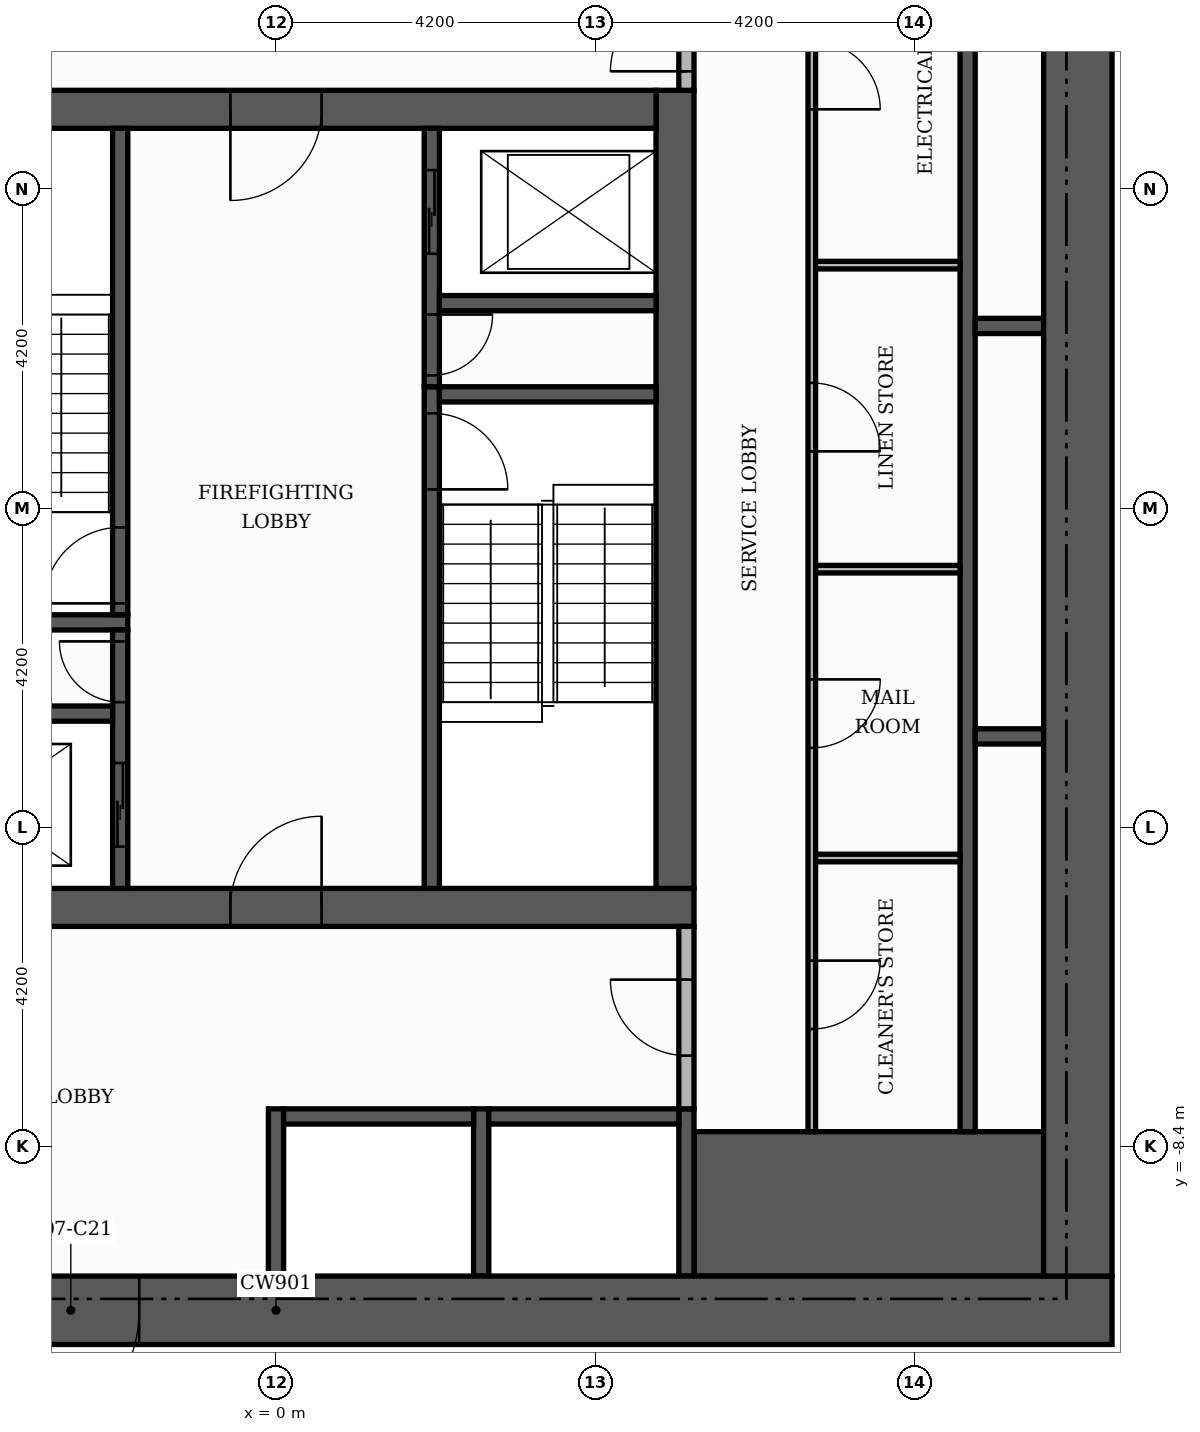
"""IFC4 building model, lengths in metres.
Left out: names, types, materials, properties, quantities, classifications, styles, units other than length and angle.
Written with IfcOpenShell. Run it as: python <this file> out.ifc"""

import sys

from ifc_helpers import new_model, si_unit, direction, frame, frame_2d, origin, place, context, subcontext, project, spatial, rectangle, extrude, element, fill, save


model = new_model("IFC4")
c1 = context("Model", 3, precision=1e-05, world=origin(), true_north=direction((0.0, 1.0)))
c2 = subcontext(c1, "Body", "Model", "MODEL_VIEW")
j1 = project(units=[si_unit("LENGTHUNIT", "METRE"), si_unit("PLANEANGLEUNIT", "RADIAN")], contexts=[c1])
p1 = place(None, origin())
s1 = spatial("IfcSite", under=j1, at=p1, CompositionType="ELEMENT")
p2 = place(p1, origin())
s2 = spatial("IfcBuilding", under=s1, at=p2, CompositionType="ELEMENT")
p3 = place(p2, frame((0.0, 0.0, 34.8)))
s3 = spatial("IfcBuildingStorey", under=s2, at=p3, CompositionType="ELEMENT", Elevation=34.8)
p4 = place(p3, frame((-5.5, -5.25, 0.0), z_axis=(0.0, 0.0, 1.0), x_axis=(1.0, 0.0, 0.0)))
e1 = element("IfcWall", 1, at=p4, inside=s3, PredefinedType="SHEAR", context=c2, shape_type="SweptSolid", body=[
    extrude(rectangle(XDim=11.0, YDim=0.5, at=frame_2d((5.5, 0.0))), origin(), (0.0, 0.0, 1.0), 3.48),
])
p5 = place(p4, frame((4.9, 0.0, 0.0)))
e2 = element("IfcOpeningElement", 2, at=p5, cuts=e1, PredefinedType="OPENING", context=c2, shape_type="SweptSolid", body=[
    extrude(rectangle(XDim=1.2, YDim=2.1, at=frame_2d((0.6, 1.05))), frame((0.0, 0.26, 0.0), z_axis=(0.0, -1.0, 0.0), x_axis=(1.0, 0.0, 0.0)), (0.0, 0.0, 1.0), 0.52),
])
p6 = place(p3, frame((5.25, -5.0, 0.0), z_axis=(0.0, 0.0, 1.0), x_axis=(0.0, 1.0, 0.0)))
e3 = element("IfcWall", 3, at=p6, inside=s3, PredefinedType="SHEAR", context=c2, shape_type="SweptSolid", body=[
    extrude(rectangle(XDim=10.5, YDim=0.5, at=frame_2d((5.25, 0.0))), origin(), (0.0, 0.0, 1.0), 3.48),
])
p7 = place(p3, frame((-5.0, 5.25, 0.0), z_axis=(0.0, 0.0, 1.0), x_axis=(1.0, 0.0, 0.0)))
e4 = element("IfcWall", 4, at=p7, inside=s3, PredefinedType="SHEAR", context=c2, shape_type="SweptSolid", body=[
    extrude(rectangle(XDim=10.0, YDim=0.5, at=frame_2d((5.0, 0.0))), origin(), (0.0, 0.0, 1.0), 3.48),
])
p8 = place(p7, frame((4.4, 0.0, 0.0)))
e5 = element("IfcOpeningElement", 5, at=p8, cuts=e4, PredefinedType="OPENING", context=c2, shape_type="SweptSolid", body=[
    extrude(rectangle(XDim=1.2, YDim=2.1, at=frame_2d((0.6, 1.05))), frame((0.0, 0.26, 0.0), z_axis=(0.0, -1.0, 0.0), x_axis=(1.0, 0.0, 0.0)), (0.0, 0.0, 1.0), 0.52),
])
p9 = place(p3, frame((5.5, -9.15, 0.0), z_axis=(0.0, 0.0, 1.0), x_axis=(1.0, 0.0, 0.0)))
e6 = element("IfcWall", 6, at=p9, inside=s3, PredefinedType="SHEAR", context=c2, shape_type="SweptSolid", body=[
    extrude(rectangle(XDim=4.6, YDim=1.9, at=frame_2d((2.3, 0.0))), origin(), (0.0, 0.0, 1.0), 3.48),
])
p10 = place(p3, frame((2.05, -5.0, 0.0), z_axis=(0.0, 0.0, 1.0), x_axis=(0.0, 1.0, 0.0)))
e7 = element("IfcWall", 7, at=p10, inside=s3, PredefinedType="SHEAR", context=c2, shape_type="SweptSolid", body=[
    extrude(rectangle(XDim=6.6, YDim=0.2, at=frame_2d((3.3, 0.0))), origin(), (0.0, 0.0, 1.0), 3.48),
])
p11 = place(p10, frame((5.25, 0.0, 0.0)))
e8 = element("IfcOpeningElement", 8, at=p11, cuts=e7, PredefinedType="OPENING", context=c2, shape_type="SweptSolid", body=[
    extrude(rectangle(XDim=1.0, YDim=2.1, at=frame_2d((0.5, 1.05))), frame((0.0, 0.11, 0.0), z_axis=(0.0, -1.0, 0.0), x_axis=(1.0, 0.0, 0.0)), (0.0, 0.0, 1.0), 0.22),
])
p12 = place(p3, frame((-5.0, -1.5, 0.0), z_axis=(0.0, 0.0, 1.0), x_axis=(1.0, 0.0, 0.0)))
e9 = element("IfcWall", 9, at=p12, inside=s3, PredefinedType="SHEAR", context=c2, shape_type="SweptSolid", body=[
    extrude(rectangle(XDim=3.05, YDim=0.2, at=frame_2d((1.525, 0.0))), origin(), (0.0, 0.0, 1.0), 3.48),
])
p13 = place(p3, frame((-2.05, -1.4, 0.0), z_axis=(0.0, 0.0, 1.0), x_axis=(0.0, 1.0, 0.0)))
e10 = element("IfcWall", 10, at=p13, inside=s3, PredefinedType="SHEAR", context=c2, shape_type="SweptSolid", body=[
    extrude(rectangle(XDim=6.4, YDim=0.2, at=frame_2d((3.2, 0.0))), origin(), (0.0, 0.0, 1.0), 3.48),
])
p14 = place(p13, frame((0.15, 0.0, 0.0)))
e11 = element("IfcOpeningElement", 11, at=p14, cuts=e10, PredefinedType="OPENING", context=c2, shape_type="SweptSolid", body=[
    extrude(rectangle(XDim=1.0, YDim=2.1, at=frame_2d((0.5, 1.05))), frame((0.0, 0.11, 0.0), z_axis=(0.0, -1.0, 0.0), x_axis=(1.0, 0.0, 0.0)), (0.0, 0.0, 1.0), 0.22),
])
p15 = place(p3, frame((2.15, 1.5, 0.0), z_axis=(0.0, 0.0, 1.0), x_axis=(1.0, 0.0, 0.0)))
e12 = element("IfcWall", 12, at=p15, inside=s3, PredefinedType="SHEAR", context=c2, shape_type="SweptSolid", body=[
    extrude(rectangle(XDim=2.85, YDim=0.2, at=frame_2d((1.425, 0.0))), origin(), (0.0, 0.0, 1.0), 3.48),
])
for number, where, z_axis, x_axis in (
    (13, (0.0, -10.1, 0.0), (0.0, 0.0, 1.0), (0.0, 1.0, 0.0)),
    (14, (2.7, -10.1, 0.0), (0.0, 0.0, 1.0), (0.0, 1.0, 0.0)),
    (15, (5.4, -10.1, 0.0), (0.0, 0.0, 1.0), (0.0, 1.0, 0.0)),
):
    element("IfcWall", number, at=place(p3, frame(where, z_axis=z_axis, x_axis=x_axis)), inside=s3, PredefinedType="SHEAR", context=c2, shape_type="SweptSolid", body=[
        extrude(rectangle(XDim=2.2, YDim=0.2, at=frame_2d((1.1, 0.0))), origin(), (0.0, 0.0, 1.0), 3.48),
    ])
p16 = place(p3, frame((9.1, -8.2, 0.0), z_axis=(0.0, 0.0, 1.0), x_axis=(0.0, 1.0, 0.0)))
e16 = element("IfcWall", 16, at=p16, inside=s3, PredefinedType="SHEAR", context=c2, shape_type="SweptSolid", body=[
    extrude(rectangle(XDim=16.4, YDim=0.2, at=frame_2d((8.2, 0.0))), origin(), (0.0, 0.0, 1.0), 3.48),
])
for number, where, z_axis, x_axis in (
    (17, (0.1, -8.0, 0.0), (0.0, 0.0, 1.0), (1.0, 0.0, 0.0)),
    (18, (2.8, -8.0, 0.0), (0.0, 0.0, 1.0), (1.0, 0.0, 0.0)),
):
    element("IfcWall", number, at=place(p3, frame(where, z_axis=z_axis, x_axis=x_axis)), inside=s3, PredefinedType="SHEAR", context=c2, shape_type="SweptSolid", body=[
        extrude(rectangle(XDim=2.5, YDim=0.2, at=frame_2d((1.25, 0.0))), origin(), (0.0, 0.0, 1.0), 3.48),
    ])
p17 = place(p3, frame((-2.05, -5.0, 0.0), z_axis=(0.0, 0.0, 1.0), x_axis=(0.0, 1.0, 0.0)))
e19 = element("IfcWall", 19, at=p17, inside=s3, PredefinedType="SHEAR", context=c2, shape_type="SweptSolid", body=[
    extrude(rectangle(XDim=3.4, YDim=0.2, at=frame_2d((1.7, 0.0))), origin(), (0.0, 0.0, 1.0), 3.48),
])
p18 = place(p17, frame((0.55, 0.0, 0.0)))
e20 = element("IfcOpeningElement", 20, at=p18, cuts=e19, PredefinedType="OPENING", context=c2, shape_type="SweptSolid", body=[
    extrude(rectangle(XDim=1.1, YDim=2.1, at=frame_2d((0.55, 1.05))), frame((0.0, 0.11, 0.0), z_axis=(0.0, -1.0, 0.0), x_axis=(1.0, 0.0, 0.0)), (0.0, 0.0, 1.0), 0.22),
])
p19 = place(p17, frame((2.45, 0.0, 0.0)))
e21 = element("IfcOpeningElement", 21, at=p19, cuts=e19, PredefinedType="OPENING", context=c2, shape_type="SweptSolid", body=[
    extrude(rectangle(XDim=0.8, YDim=2.1, at=frame_2d((0.4, 1.05))), frame((0.0, 0.11, 0.0), z_axis=(0.0, -1.0, 0.0), x_axis=(1.0, 0.0, 0.0)), (0.0, 0.0, 1.0), 0.22),
])
p20 = place(p3, frame((9.2, -3.0, 0.0), z_axis=(0.0, 0.0, 1.0), x_axis=(1.0, 0.0, 0.0)))
e22 = element("IfcWall", 22, at=p20, inside=s3, PredefinedType="SHEAR", context=c2, shape_type="SweptSolid", body=[
    extrude(rectangle(XDim=0.9, YDim=0.2, at=frame_2d((0.45, 0.0))), origin(), (0.0, 0.0, 1.0), 3.48),
])
p21 = place(p3, frame((-5.0, -2.7, 0.0), z_axis=(0.0, 0.0, 1.0), x_axis=(1.0, 0.0, 0.0)))
e23 = element("IfcWall", 23, at=p21, inside=s3, PredefinedType="SHEAR", context=c2, shape_type="SweptSolid", body=[
    extrude(rectangle(XDim=2.85, YDim=0.2, at=frame_2d((1.425, 0.0))), origin(), (0.0, 0.0, 1.0), 3.48),
])
p22 = place(p3, frame((2.05, 1.6, 0.0), z_axis=(0.0, 0.0, 1.0), x_axis=(0.0, 1.0, 0.0)))
e24 = element("IfcWall", 24, at=p22, inside=s3, PredefinedType="SHEAR", context=c2, shape_type="SweptSolid", body=[
    extrude(rectangle(XDim=3.4, YDim=0.2, at=frame_2d((1.7, 0.0))), origin(), (0.0, 0.0, 1.0), 3.48),
])
p23 = place(p22, frame((1.75, 0.0, 0.0)))
e25 = element("IfcOpeningElement", 25, at=p23, cuts=e24, PredefinedType="OPENING", context=c2, shape_type="SweptSolid", body=[
    extrude(rectangle(XDim=1.1, YDim=2.1, at=frame_2d((0.55, 1.05))), frame((0.0, 0.11, 0.0), z_axis=(0.0, -1.0, 0.0), x_axis=(1.0, 0.0, 0.0)), (0.0, 0.0, 1.0), 0.22),
])
p24 = place(p22, frame((0.15, 0.0, 0.0)))
e26 = element("IfcOpeningElement", 26, at=p24, cuts=e24, PredefinedType="OPENING", context=c2, shape_type="SweptSolid", body=[
    extrude(rectangle(XDim=0.8, YDim=2.1, at=frame_2d((0.4, 1.05))), frame((0.0, 0.11, 0.0), z_axis=(0.0, -1.0, 0.0), x_axis=(1.0, 0.0, 0.0)), (0.0, 0.0, 1.0), 0.22),
])
p25 = place(p3, frame((9.2, 2.4, 0.0), z_axis=(0.0, 0.0, 1.0), x_axis=(1.0, 0.0, 0.0)))
e27 = element("IfcWall", 27, at=p25, inside=s3, PredefinedType="SHEAR", context=c2, shape_type="SweptSolid", body=[
    extrude(rectangle(XDim=0.9, YDim=0.2, at=frame_2d((0.45, 0.0))), origin(), (0.0, 0.0, 1.0), 3.48),
])
p26 = place(p3, frame((2.15, 2.7, 0.0), z_axis=(0.0, 0.0, 1.0), x_axis=(1.0, 0.0, 0.0)))
e28 = element("IfcWall", 28, at=p26, inside=s3, PredefinedType="SHEAR", context=c2, shape_type="SweptSolid", body=[
    extrude(rectangle(XDim=2.85, YDim=0.2, at=frame_2d((1.425, 0.0))), origin(), (0.0, 0.0, 1.0), 3.48),
])
p27 = place(p3, frame((-11.0, -10.55, 0.0), z_axis=(0.0, 0.0, 1.0), x_axis=(1.0, 0.0, 0.0)))
e29 = element("IfcWall", 29, at=p27, inside=s3, PredefinedType="SHEAR", context=c2, shape_type="SweptSolid", body=[
    extrude(rectangle(XDim=22.0, YDim=0.9, at=frame_2d((11.0, 0.0))), origin(), (0.0, 0.0, 1.0), 3.48),
])
p28 = place(p27, frame((7.4, 0.0, 0.0)))
e30 = element("IfcOpeningElement", 30, at=p28, cuts=e29, PredefinedType="OPENING", context=c2, shape_type="SweptSolid", body=[
    extrude(rectangle(XDim=1.8, YDim=2.2, at=frame_2d((0.9, 1.1))), frame((0.0, 0.46, 0.0), z_axis=(0.0, -1.0, 0.0), x_axis=(1.0, 0.0, 0.0)), (0.0, 0.0, 1.0), 0.92),
])
p29 = place(p3, frame((10.55, -10.1, 0.0), z_axis=(0.0, 0.0, 1.0), x_axis=(0.0, 1.0, 0.0)))
e31 = element("IfcWall", 31, at=p29, inside=s3, PredefinedType="SHEAR", context=c2, shape_type="SweptSolid", body=[
    extrude(rectangle(XDim=20.2, YDim=0.9, at=frame_2d((10.1, 0.0))), origin(), (0.0, 0.0, 1.0), 3.48),
])
p30 = place(p3, frame((7.05, -8.2, 0.0), z_axis=(0.0, 0.0, 1.0), x_axis=(0.0, 1.0, 0.0)))
e32 = element("IfcWall", 32, at=p30, inside=s3, PredefinedType="PARTITIONING", context=c2, shape_type="SweptSolid", body=[
    extrude(rectangle(XDim=16.4, YDim=0.1, at=frame_2d((8.2, 0.0))), origin(), (0.0, 0.0, 1.0), 3.48),
])
p31 = place(p30, frame((1.35, 0.0, 0.0)))
e33 = element("IfcOpeningElement", 33, at=p31, cuts=e32, PredefinedType="OPENING", context=c2, shape_type="SweptSolid", body=[
    extrude(rectangle(XDim=0.9, YDim=2.1, at=frame_2d((0.45, 1.05))), frame((0.0, 0.06, 0.0), z_axis=(0.0, -1.0, 0.0), x_axis=(1.0, 0.0, 0.0)), (0.0, 0.0, 1.0), 0.12),
])
p32 = place(p30, frame((5.05, 0.0, 0.0)))
e34 = element("IfcOpeningElement", 34, at=p32, cuts=e32, PredefinedType="OPENING", context=c2, shape_type="SweptSolid", body=[
    extrude(rectangle(XDim=0.9, YDim=2.1, at=frame_2d((0.45, 1.05))), frame((0.0, 0.06, 0.0), z_axis=(0.0, -1.0, 0.0), x_axis=(1.0, 0.0, 0.0)), (0.0, 0.0, 1.0), 0.12),
])
p33 = place(p30, frame((8.95, 0.0, 0.0)))
e35 = element("IfcOpeningElement", 35, at=p33, cuts=e32, PredefinedType="OPENING", context=c2, shape_type="SweptSolid", body=[
    extrude(rectangle(XDim=0.9, YDim=2.1, at=frame_2d((0.45, 1.05))), frame((0.0, 0.06, 0.0), z_axis=(0.0, -1.0, 0.0), x_axis=(1.0, 0.0, 0.0)), (0.0, 0.0, 1.0), 0.12),
])
p34 = place(p30, frame((13.45, 0.0, 0.0)))
e36 = element("IfcOpeningElement", 36, at=p34, cuts=e32, PredefinedType="OPENING", context=c2, shape_type="SweptSolid", body=[
    extrude(rectangle(XDim=0.9, YDim=2.1, at=frame_2d((0.45, 1.05))), frame((0.0, 0.06, 0.0), z_axis=(0.0, -1.0, 0.0), x_axis=(1.0, 0.0, 0.0)), (0.0, 0.0, 1.0), 0.12),
])
p35 = place(p3, frame((5.4, -7.9, 0.0), z_axis=(0.0, 0.0, 1.0), x_axis=(0.0, 1.0, 0.0)))
e37 = element("IfcWall", 37, at=p35, inside=s3, PredefinedType="PARTITIONING", context=c2, shape_type="SweptSolid", body=[
    extrude(rectangle(XDim=2.4, YDim=0.2, at=frame_2d((1.2, 0.0))), origin(), (0.0, 0.0, 1.0), 3.48),
])
p36 = place(p35, frame((0.7, 0.0, 0.0)))
e38 = element("IfcOpeningElement", 38, at=p36, cuts=e37, PredefinedType="OPENING", context=c2, shape_type="SweptSolid", body=[
    extrude(rectangle(XDim=1.0, YDim=2.1, at=frame_2d((0.5, 1.05))), frame((0.0, 0.11, 0.0), z_axis=(0.0, -1.0, 0.0), x_axis=(1.0, 0.0, 0.0)), (0.0, 0.0, 1.0), 0.22),
])
for number, where, z_axis, x_axis in (
    (39, (7.1, -4.6, 0.0), (0.0, 0.0, 1.0), (1.0, 0.0, 0.0)),
    (40, (7.1, -0.8, 0.0), (0.0, 0.0, 1.0), (1.0, 0.0, 0.0)),
    (41, (7.1, 3.2, 0.0), (0.0, 0.0, 1.0), (1.0, 0.0, 0.0)),
):
    element("IfcWall", number, at=place(p3, frame(where, z_axis=z_axis, x_axis=x_axis)), inside=s3, PredefinedType="PARTITIONING", context=c2, shape_type="SweptSolid", body=[
        extrude(rectangle(XDim=1.9, YDim=0.1, at=frame_2d((0.95, 0.0))), origin(), (0.0, 0.0, 1.0), 3.48),
    ])
p37 = place(p3, frame((5.4, 5.5, 0.0), z_axis=(0.0, 0.0, 1.0), x_axis=(0.0, 1.0, 0.0)))
e42 = element("IfcWall", 42, at=p37, inside=s3, PredefinedType="PARTITIONING", context=c2, shape_type="SweptSolid", body=[
    extrude(rectangle(XDim=4.6, YDim=0.2, at=frame_2d((2.3, 0.0))), origin(), (0.0, 0.0, 1.0), 3.48),
])
p38 = place(p37, frame((0.25, 0.0, 0.0)))
e43 = element("IfcOpeningElement", 43, at=p38, cuts=e42, PredefinedType="OPENING", context=c2, shape_type="SweptSolid", body=[
    extrude(rectangle(XDim=1.0, YDim=2.1, at=frame_2d((0.5, 1.05))), frame((0.0, 0.11, 0.0), z_axis=(0.0, -1.0, 0.0), x_axis=(1.0, 0.0, 0.0)), (0.0, 0.0, 1.0), 0.22),
])
p39 = place(p23, origin())
e44 = element("IfcDoor", 44, at=p39, inside=s3, OperationType="SLIDING_TO_LEFT", PredefinedType="DOOR", context=c2, shape_type="SweptSolid", body=[
    extrude(rectangle(XDim=1.1, YDim=2.1, at=frame_2d((0.55, 1.05))), frame((0.0, 0.025, 0.0), z_axis=(0.0, -1.0, 0.0), x_axis=(1.0, 0.0, 0.0)), (0.0, 0.0, 1.0), 0.05),
])
fill(e25, e44)
p40 = place(p18, origin())
e45 = element("IfcDoor", 45, at=p40, inside=s3, OperationType="SLIDING_TO_LEFT", PredefinedType="DOOR", context=c2, shape_type="SweptSolid", body=[
    extrude(rectangle(XDim=1.1, YDim=2.1, at=frame_2d((0.55, 1.05))), frame((0.0, 0.025, 0.0), z_axis=(0.0, -1.0, 0.0), x_axis=(1.0, 0.0, 0.0)), (0.0, 0.0, 1.0), 0.05),
])
fill(e20, e45)
p41 = place(p14, origin())
e46 = element("IfcDoor", 46, at=p41, inside=s3, OperationType="SINGLE_SWING_LEFT", PredefinedType="DOOR", context=c2, shape_type="SweptSolid", body=[
    extrude(rectangle(XDim=1.0, YDim=2.1, at=frame_2d((0.5, 1.05))), frame((0.0, 0.025, 0.0), z_axis=(0.0, -1.0, 0.0), x_axis=(1.0, 0.0, 0.0)), (0.0, 0.0, 1.0), 0.05),
])
fill(e11, e46)
p42 = place(p11, frame((1.0, 0.0, 0.0), z_axis=(0.0, 0.0, 1.0), x_axis=(-1.0, 0.0, 0.0)))
e47 = element("IfcDoor", 47, at=p42, inside=s3, OperationType="SINGLE_SWING_LEFT", PredefinedType="DOOR", context=c2, shape_type="SweptSolid", body=[
    extrude(rectangle(XDim=1.0, YDim=2.1, at=frame_2d((0.5, 1.05))), frame((0.0, 0.025, 0.0), z_axis=(0.0, -1.0, 0.0), x_axis=(1.0, 0.0, 0.0)), (0.0, 0.0, 1.0), 0.05),
])
fill(e8, e47)
p43 = place(p24, frame((0.8, 0.0, 0.0), z_axis=(0.0, 0.0, 1.0), x_axis=(-1.0, 0.0, 0.0)))
e48 = element("IfcDoor", 48, at=p43, inside=s3, OperationType="SINGLE_SWING_RIGHT", PredefinedType="DOOR", context=c2, shape_type="SweptSolid", body=[
    extrude(rectangle(XDim=0.8, YDim=2.1, at=frame_2d((0.4, 1.05))), frame((0.0, 0.025, 0.0), z_axis=(0.0, -1.0, 0.0), x_axis=(1.0, 0.0, 0.0)), (0.0, 0.0, 1.0), 0.05),
])
fill(e26, e48)
p44 = place(p19, origin())
e49 = element("IfcDoor", 49, at=p44, inside=s3, OperationType="SINGLE_SWING_RIGHT", PredefinedType="DOOR", context=c2, shape_type="SweptSolid", body=[
    extrude(rectangle(XDim=0.8, YDim=2.1, at=frame_2d((0.4, 1.05))), frame((0.0, 0.025, 0.0), z_axis=(0.0, -1.0, 0.0), x_axis=(1.0, 0.0, 0.0)), (0.0, 0.0, 1.0), 0.05),
])
fill(e21, e49)
p45 = place(p8, frame((1.2, 0.0, 0.0), z_axis=(0.0, 0.0, 1.0), x_axis=(-1.0, 0.0, 0.0)))
e50 = element("IfcDoor", 50, at=p45, inside=s3, OperationType="SINGLE_SWING_LEFT", PredefinedType="DOOR", context=c2, shape_type="SweptSolid", body=[
    extrude(rectangle(XDim=1.2, YDim=2.1, at=frame_2d((0.6, 1.05))), frame((0.0, 0.025, 0.0), z_axis=(0.0, -1.0, 0.0), x_axis=(1.0, 0.0, 0.0)), (0.0, 0.0, 1.0), 0.05),
])
fill(e5, e50)
p46 = place(p5, origin())
e51 = element("IfcDoor", 51, at=p46, inside=s3, OperationType="SINGLE_SWING_RIGHT", PredefinedType="DOOR", context=c2, shape_type="SweptSolid", body=[
    extrude(rectangle(XDim=1.2, YDim=2.1, at=frame_2d((0.6, 1.05))), frame((0.0, 0.025, 0.0), z_axis=(0.0, -1.0, 0.0), x_axis=(1.0, 0.0, 0.0)), (0.0, 0.0, 1.0), 0.05),
])
fill(e2, e51)
p47 = place(p38, origin())
e52 = element("IfcDoor", 52, at=p47, inside=s3, OperationType="SINGLE_SWING_LEFT", PredefinedType="DOOR", context=c2, shape_type="SweptSolid", body=[
    extrude(rectangle(XDim=1.0, YDim=2.1, at=frame_2d((0.5, 1.05))), frame((0.0, 0.025, 0.0), z_axis=(0.0, -1.0, 0.0), x_axis=(1.0, 0.0, 0.0)), (0.0, 0.0, 1.0), 0.05),
])
fill(e43, e52)
p48 = place(p36, origin())
e53 = element("IfcDoor", 53, at=p48, inside=s3, OperationType="SINGLE_SWING_RIGHT", PredefinedType="DOOR", context=c2, shape_type="SweptSolid", body=[
    extrude(rectangle(XDim=1.0, YDim=2.1, at=frame_2d((0.5, 1.05))), frame((0.0, 0.025, 0.0), z_axis=(0.0, -1.0, 0.0), x_axis=(1.0, 0.0, 0.0)), (0.0, 0.0, 1.0), 0.05),
])
fill(e38, e53)
p49 = place(p28, frame((1.8, 0.0, 0.0), z_axis=(0.0, 0.0, 1.0), x_axis=(-1.0, 0.0, 0.0)))
e54 = element("IfcDoor", 54, at=p49, inside=s3, OperationType="DOUBLE_DOOR_SINGLE_SWING", PredefinedType="DOOR", context=c2, shape_type="SweptSolid", body=[
    extrude(rectangle(XDim=1.8, YDim=2.2, at=frame_2d((0.9, 1.1))), frame((0.0, 0.025, 0.0), z_axis=(0.0, -1.0, 0.0), x_axis=(1.0, 0.0, 0.0)), (0.0, 0.0, 1.0), 0.05),
])
fill(e30, e54)
p50 = place(p31, frame((0.9, 0.0, 0.0), z_axis=(0.0, 0.0, 1.0), x_axis=(-1.0, 0.0, 0.0)))
e55 = element("IfcDoor", 55, at=p50, inside=s3, OperationType="SINGLE_SWING_RIGHT", PredefinedType="DOOR", context=c2, shape_type="SweptSolid", body=[
    extrude(rectangle(XDim=0.9, YDim=2.1, at=frame_2d((0.45, 1.05))), frame((0.0, 0.025, 0.0), z_axis=(0.0, -1.0, 0.0), x_axis=(1.0, 0.0, 0.0)), (0.0, 0.0, 1.0), 0.05),
])
fill(e33, e55)
p51 = place(p32, frame((0.9, 0.0, 0.0), z_axis=(0.0, 0.0, 1.0), x_axis=(-1.0, 0.0, 0.0)))
e56 = element("IfcDoor", 56, at=p51, inside=s3, OperationType="SINGLE_SWING_RIGHT", PredefinedType="DOOR", context=c2, shape_type="SweptSolid", body=[
    extrude(rectangle(XDim=0.9, YDim=2.1, at=frame_2d((0.45, 1.05))), frame((0.0, 0.025, 0.0), z_axis=(0.0, -1.0, 0.0), x_axis=(1.0, 0.0, 0.0)), (0.0, 0.0, 1.0), 0.05),
])
fill(e34, e56)
p52 = place(p33, frame((0.9, 0.0, 0.0), z_axis=(0.0, 0.0, 1.0), x_axis=(-1.0, 0.0, 0.0)))
e57 = element("IfcDoor", 57, at=p52, inside=s3, OperationType="SINGLE_SWING_LEFT", PredefinedType="DOOR", context=c2, shape_type="SweptSolid", body=[
    extrude(rectangle(XDim=0.9, YDim=2.1, at=frame_2d((0.45, 1.05))), frame((0.0, 0.025, 0.0), z_axis=(0.0, -1.0, 0.0), x_axis=(1.0, 0.0, 0.0)), (0.0, 0.0, 1.0), 0.05),
])
fill(e35, e57)
p53 = place(p34, frame((0.9, 0.0, 0.0), z_axis=(0.0, 0.0, 1.0), x_axis=(-1.0, 0.0, 0.0)))
e58 = element("IfcDoor", 58, at=p53, inside=s3, OperationType="SINGLE_SWING_LEFT", PredefinedType="DOOR", context=c2, shape_type="SweptSolid", body=[
    extrude(rectangle(XDim=0.9, YDim=2.1, at=frame_2d((0.45, 1.05))), frame((0.0, 0.025, 0.0), z_axis=(0.0, -1.0, 0.0), x_axis=(1.0, 0.0, 0.0)), (0.0, 0.0, 1.0), 0.05),
])
fill(e36, e58)
save(model, sys.argv[1])
